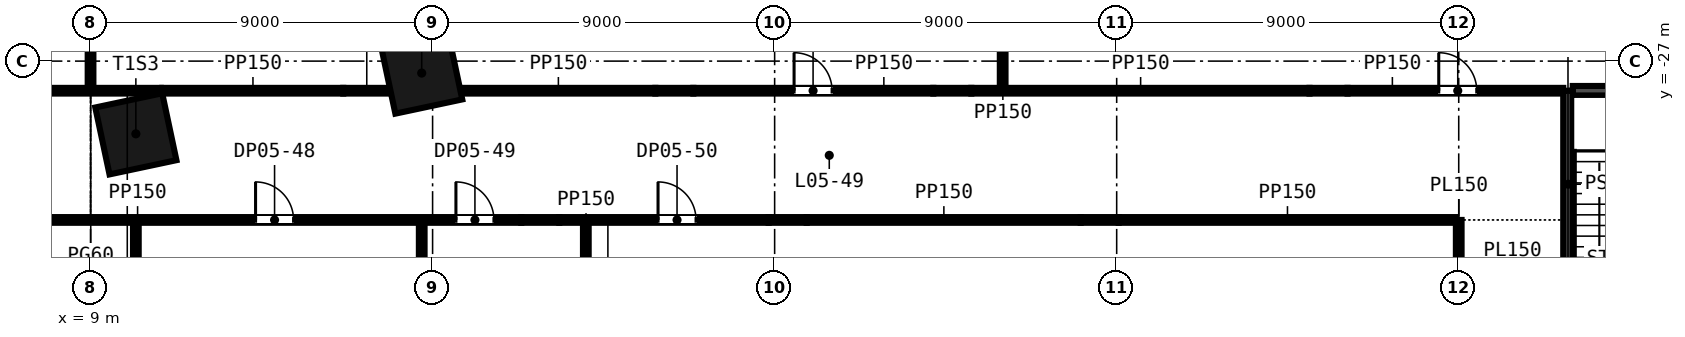
"""IFC4 building model, lengths in metres.
Left out: names, types, materials, properties, quantities, classifications, styles, units other than length and angle.
Written with IfcOpenShell. Run it as: python <this file> out.ifc"""

import sys

from ifc_helpers import new_model, si_unit, direction, frame, frame_2d, origin, origin_2d, place, context, subcontext, project, spatial, rectangle, extrude, element, fill, save


model = new_model("IFC4")
c1 = context("Model", 3, precision=1e-05, world=origin(), true_north=direction((0.0, 1.0)))
c2 = subcontext(c1, "Body", "Model", "MODEL_VIEW")
j1 = project(units=[si_unit("LENGTHUNIT", "METRE"), si_unit("PLANEANGLEUNIT", "RADIAN")], contexts=[c1])
p1 = place(None, origin())
s1 = spatial("IfcSite", under=j1, at=p1, CompositionType="ELEMENT")
p2 = place(p1, origin())
s2 = spatial("IfcBuilding", under=s1, at=p2, CompositionType="ELEMENT")
p3 = place(p2, frame((0.0, 0.0, 31.5)))
s3 = spatial("IfcBuildingStorey", under=s2, at=p3, CompositionType="ELEMENT", Elevation=31.5)
for number, where, z_axis, x_axis in (
    (1, (10.192, -28.914, -0.3), (0.0, 0.0, 1.0), (0.978, 0.208, 0.0)),
    (2, (17.714, -27.315, -0.3), (0.0, 0.0, 1.0), (0.978, 0.208, 0.0)),
):
    element("IfcColumn", number, at=place(p3, frame(where, z_axis=z_axis, x_axis=x_axis)), inside=s3, PredefinedType="COLUMN", context=c2, shape_type="SweptSolid", body=[
        extrude(rectangle(XDim=1.8, YDim=1.8, at=origin_2d()), origin(), (0.0, 0.0, 1.0), 4.65),
    ])
p4 = place(p3, frame((4.223, -31.179, 0.0), z_axis=(0.0, 0.0, 1.0), x_axis=(1.0, 0.0, 0.0)))
e3 = element("IfcWall", 3, at=p4, inside=s3, PredefinedType="PARTITIONING", context=c2, shape_type="SweptSolid", body=[
    extrude(rectangle(XDim=16.11, YDim=0.15, at=frame_2d((8.055, 0.0))), origin(), (0.0, 0.0, 1.0), 4.35),
])
p5 = place(p4, frame((1.9, 0.0, 0.0)))
e4 = element("IfcOpeningElement", 4, at=p5, cuts=e3, PredefinedType="OPENING", context=c2, shape_type="SweptSolid", body=[
    extrude(rectangle(XDim=1.0, YDim=2.1, at=frame_2d((0.5, 1.05))), frame((0.0, 0.085, 0.0), z_axis=(0.0, -1.0, 0.0), x_axis=(1.0, 0.0, 0.0)), (0.0, 0.0, 1.0), 0.17),
])
p6 = place(p4, frame((9.119, 0.0, 0.0)))
e5 = element("IfcOpeningElement", 5, at=p6, cuts=e3, PredefinedType="OPENING", context=c2, shape_type="SweptSolid", body=[
    extrude(rectangle(XDim=1.0, YDim=2.1, at=frame_2d((0.5, 1.05))), frame((0.0, 0.085, 0.0), z_axis=(0.0, -1.0, 0.0), x_axis=(1.0, 0.0, 0.0)), (0.0, 0.0, 1.0), 0.17),
])
p7 = place(p4, frame((14.391, 0.0, 0.0)))
e6 = element("IfcOpeningElement", 6, at=p7, cuts=e3, PredefinedType="OPENING", context=c2, shape_type="SweptSolid", body=[
    extrude(rectangle(XDim=1.0, YDim=2.1, at=frame_2d((0.5, 1.05))), frame((0.0, 0.085, 0.0), z_axis=(0.0, -1.0, 0.0), x_axis=(1.0, 0.0, 0.0)), (0.0, 0.0, 1.0), 0.17),
])
p8 = place(p3, frame((20.333, -31.179, 0.0), z_axis=(0.0, 0.0, 1.0), x_axis=(1.0, 0.0, 0.0)))
e7 = element("IfcWall", 7, at=p8, inside=s3, PredefinedType="PARTITIONING", context=c2, shape_type="SweptSolid", body=[
    extrude(rectangle(XDim=1.0, YDim=0.15, at=frame_2d((0.5, 0.0))), origin(), (0.0, 0.0, 1.0), 3.591),
])
p9 = place(p3, frame((21.333, -31.179, 0.0), z_axis=(0.0, 0.0, 1.0), x_axis=(1.0, 0.0, 0.0)))
e8 = element("IfcWall", 8, at=p9, inside=s3, PredefinedType="PARTITIONING", context=c2, shape_type="SweptSolid", body=[
    extrude(rectangle(XDim=5.51, YDim=0.15, at=frame_2d((2.755, 0.0))), origin(), (0.0, 0.0, 1.0), 4.35),
])
p10 = place(p9, frame((2.599, 0.0, 0.0)))
e9 = element("IfcOpeningElement", 9, at=p10, cuts=e8, PredefinedType="OPENING", context=c2, shape_type="SweptSolid", body=[
    extrude(rectangle(XDim=1.0, YDim=2.1, at=frame_2d((0.5, 1.05))), frame((0.0, 0.085, 0.0), z_axis=(0.0, -1.0, 0.0), x_axis=(1.0, 0.0, 0.0)), (0.0, 0.0, 1.0), 0.17),
])
p11 = place(p3, frame((26.843, -31.179, 0.0), z_axis=(0.0, 0.0, 1.0), x_axis=(1.0, 0.0, 0.0)))
e10 = element("IfcWall", 10, at=p11, inside=s3, PredefinedType="PARTITIONING", context=c2, shape_type="SweptSolid", body=[
    extrude(rectangle(XDim=1.0, YDim=0.15, at=frame_2d((0.5, 0.0))), origin(), (0.0, 0.0, 1.0), 3.436),
])
p12 = place(p3, frame((27.843, -31.179, 0.0), z_axis=(0.0, 0.0, 1.0), x_axis=(1.0, 0.0, 0.0)))
e11 = element("IfcWall", 11, at=p12, inside=s3, PredefinedType="PARTITIONING", context=c2, shape_type="SweptSolid", body=[
    extrude(rectangle(XDim=7.209, YDim=0.15, at=frame_2d((3.605, 0.0))), origin(), (0.0, 0.0, 1.0), 4.35),
])
p13 = place(p3, frame((35.053, -31.179, 0.0), z_axis=(0.0, 0.0, 1.0), x_axis=(1.0, 0.0, 0.0)))
e12 = element("IfcWall", 12, at=p13, inside=s3, PredefinedType="PARTITIONING", context=c2, shape_type="SweptSolid", body=[
    extrude(rectangle(XDim=1.0, YDim=0.15, at=frame_2d((0.5, 0.0))), origin(), (0.0, 0.0, 1.0), 3.261),
])
p14 = place(p3, frame((36.053, -31.179, 0.0), z_axis=(0.0, 0.0, 1.0), x_axis=(1.0, 0.0, 0.0)))
e13 = element("IfcWall", 13, at=p14, inside=s3, PredefinedType="PARTITIONING", context=c2, shape_type="SweptSolid", body=[
    extrude(rectangle(XDim=8.872, YDim=0.15, at=frame_2d((4.436, 0.0))), origin(), (0.0, 0.0, 1.0), 4.35),
])
p15 = place(p3, frame((0.75, -27.779, 0.0), z_axis=(0.0, 0.0, 1.0), x_axis=(1.0, 0.0, 0.0)))
e14 = element("IfcWall", 14, at=p15, inside=s3, PredefinedType="PARTITIONING", context=c2, shape_type="SweptSolid", body=[
    extrude(rectangle(XDim=8.175, YDim=0.15, at=frame_2d((4.087, 0.0))), origin(), (0.0, 0.0, 1.0), 4.35),
])
p16 = place(p3, frame((9.075, -27.779, 0.0), z_axis=(0.0, 0.0, 1.0), x_axis=(1.0, 0.0, 0.0)))
e15 = element("IfcWall", 15, at=p16, inside=s3, PredefinedType="PARTITIONING", context=c2, shape_type="SweptSolid", body=[
    extrude(rectangle(XDim=1.773, YDim=0.15, at=frame_2d((0.886, 0.0))), origin(), (0.0, 0.0, 1.0), 4.35),
])
p17 = place(p3, frame((10.887, -27.779, 0.0), z_axis=(0.0, 0.0, 1.0), x_axis=(1.0, 0.0, 0.0)))
e16 = element("IfcWall", 16, at=p17, inside=s3, PredefinedType="PARTITIONING", context=c2, shape_type="SweptSolid", body=[
    extrude(rectangle(XDim=4.762, YDim=0.15, at=frame_2d((2.381, 0.0))), origin(), (0.0, 0.0, 1.0), 4.35),
])
p18 = place(p3, frame((15.65, -27.779, 0.0), z_axis=(0.0, 0.0, 1.0), x_axis=(1.0, 0.0, 0.0)))
e17 = element("IfcWall", 17, at=p18, inside=s3, PredefinedType="PARTITIONING", context=c2, shape_type="SweptSolid", body=[
    extrude(rectangle(XDim=1.227, YDim=0.15, at=frame_2d((0.613, 0.0))), origin(), (0.0, 0.0, 1.0), 3.5),
])
p19 = place(p3, frame((18.748, -27.779, 0.0), z_axis=(0.0, 0.0, 1.0), x_axis=(1.0, 0.0, 0.0)))
e18 = element("IfcWall", 18, at=p19, inside=s3, PredefinedType="PARTITIONING", context=c2, shape_type="SweptSolid", body=[
    extrude(rectangle(XDim=5.113, YDim=0.15, at=frame_2d((2.557, 0.0))), origin(), (0.0, 0.0, 1.0), 4.35),
])
p20 = place(p3, frame((23.862, -27.779, 0.0), z_axis=(0.0, 0.0, 1.0), x_axis=(1.0, 0.0, 0.0)))
e19 = element("IfcWall", 19, at=p20, inside=s3, PredefinedType="PARTITIONING", context=c2, shape_type="SweptSolid", body=[
    extrude(rectangle(XDim=1.0, YDim=0.15, at=frame_2d((0.5, 0.0))), origin(), (0.0, 0.0, 1.0), 3.436),
])
p21 = place(p3, frame((24.862, -27.779, 0.0), z_axis=(0.0, 0.0, 1.0), x_axis=(1.0, 0.0, 0.0)))
e20 = element("IfcWall", 20, at=p21, inside=s3, PredefinedType="PARTITIONING", context=c2, shape_type="SweptSolid", body=[
    extrude(rectangle(XDim=6.314, YDim=0.15, at=frame_2d((3.157, 0.0))), origin(), (0.0, 0.0, 1.0), 4.35),
])
p22 = place(p21, frame((2.65, 0.0, 0.0)))
e21 = element("IfcOpeningElement", 21, at=p22, cuts=e20, PredefinedType="OPENING", context=c2, shape_type="SweptSolid", body=[
    extrude(rectangle(XDim=1.0, YDim=2.1, at=frame_2d((0.5, 1.05))), frame((0.0, 0.085, 0.0), z_axis=(0.0, -1.0, 0.0), x_axis=(1.0, 0.0, 0.0)), (0.0, 0.0, 1.0), 0.17),
])
p23 = place(p3, frame((31.176, -27.779, 0.0), z_axis=(0.0, 0.0, 1.0), x_axis=(1.0, 0.0, 0.0)))
e22 = element("IfcWall", 22, at=p23, inside=s3, PredefinedType="PARTITIONING", context=c2, shape_type="SweptSolid", body=[
    extrude(rectangle(XDim=1.0, YDim=0.15, at=frame_2d((0.5, 0.0))), origin(), (0.0, 0.0, 1.0), 3.261),
])
p24 = place(p3, frame((32.176, -27.779, 0.0), z_axis=(0.0, 0.0, 1.0), x_axis=(1.0, 0.0, 0.0)))
e23 = element("IfcWall", 23, at=p24, inside=s3, PredefinedType="PARTITIONING", context=c2, shape_type="SweptSolid", body=[
    extrude(rectangle(XDim=8.898, YDim=0.15, at=frame_2d((4.449, 0.0))), origin(), (0.0, 0.0, 1.0), 4.35),
])
p25 = place(p3, frame((41.074, -27.779, 0.0), z_axis=(0.0, 0.0, 1.0), x_axis=(1.0, 0.0, 0.0)))
e24 = element("IfcWall", 24, at=p25, inside=s3, PredefinedType="PARTITIONING", context=c2, shape_type="SweptSolid", body=[
    extrude(rectangle(XDim=1.0, YDim=0.15, at=frame_2d((0.5, 0.0))), origin(), (0.0, 0.0, 1.0), 3.261),
])
p26 = place(p3, frame((42.074, -27.779, 0.0), z_axis=(0.0, 0.0, 1.0), x_axis=(1.0, 0.0, 0.0)))
e25 = element("IfcWall", 25, at=p26, inside=s3, PredefinedType="PARTITIONING", context=c2, shape_type="SweptSolid", body=[
    extrude(rectangle(XDim=5.676, YDim=0.15, at=frame_2d((2.838, 0.0))), origin(), (0.0, 0.0, 1.0), 4.35),
])
p27 = place(p26, frame((2.4, 0.0, 0.0)))
e26 = element("IfcOpeningElement", 26, at=p27, cuts=e25, PredefinedType="OPENING", context=c2, shape_type="SweptSolid", body=[
    extrude(rectangle(XDim=1.0, YDim=2.1, at=frame_2d((0.5, 1.05))), frame((0.0, 0.085, 0.0), z_axis=(0.0, -1.0, 0.0), x_axis=(1.0, 0.0, 0.0)), (0.0, 0.0, 1.0), 0.17),
])
p28 = place(p3, frame((48.0, -27.779, 0.0), z_axis=(0.0, 0.0, 1.0), x_axis=(1.0, 0.0, 0.0)))
e27 = element("IfcWall", 27, at=p28, inside=s3, PredefinedType="SHEAR", context=c2, shape_type="SweptSolid", body=[
    extrude(rectangle(XDim=3.0, YDim=0.25, at=frame_2d((1.5, 0.0))), origin(), (0.0, 0.0, 1.0), 4.35),
])
p29 = place(p3, frame((9.0, -27.778, 0.0), z_axis=(0.0, 0.0, 1.0), x_axis=(0.0, 1.0, 0.0)))
e28 = element("IfcWall", 28, at=p29, inside=s3, PredefinedType="PARTITIONING", context=c2, shape_type="SweptSolid", body=[
    extrude(rectangle(XDim=3.825, YDim=0.15, at=frame_2d((1.913, 0.0))), origin(), (0.0, 0.0, 1.0), 4.35),
])
p30 = place(p3, frame((10.192, -40.4, 0.0), z_axis=(0.0, 0.0, 1.0), x_axis=(0.0, 1.0, 0.0)))
e29 = element("IfcWall", 29, at=p30, inside=s3, PredefinedType="PARTITIONING", context=c2, shape_type="SweptSolid", body=[
    extrude(rectangle(XDim=9.146, YDim=0.15, at=frame_2d((4.573, 0.0))), origin(), (0.0, 0.0, 1.0), 4.35),
])
p31 = place(p3, frame((17.714, -35.42, 0.0), z_axis=(0.0, 0.0, 1.0), x_axis=(0.0, 1.0, 0.0)))
e30 = element("IfcWall", 30, at=p31, inside=s3, PredefinedType="PARTITIONING", context=c2, shape_type="SweptSolid", body=[
    extrude(rectangle(XDim=4.167, YDim=0.15, at=frame_2d((2.083, 0.0))), origin(), (0.0, 0.0, 1.0), 4.35),
])
p32 = place(p3, frame((22.032, -32.473, 0.0), z_axis=(0.0, 0.0, 1.0), x_axis=(0.0, 1.0, 0.0)))
e31 = element("IfcWall", 31, at=p32, inside=s3, PredefinedType="PARTITIONING", context=c2, shape_type="SweptSolid", body=[
    extrude(rectangle(XDim=1.219, YDim=0.15, at=frame_2d((0.61, 0.0))), origin(), (0.0, 0.0, 1.0), 4.35),
])
p33 = place(p3, frame((33.0, -27.704, 0.0), z_axis=(0.0, 0.0, 1.0), x_axis=(0.0, 1.0, 0.0)))
e32 = element("IfcWall", 32, at=p33, inside=s3, PredefinedType="PARTITIONING", context=c2, shape_type="SweptSolid", body=[
    extrude(rectangle(XDim=5.154, YDim=0.15, at=frame_2d((2.577, 0.0))), origin(), (0.0, 0.0, 1.0), 4.35),
])
p34 = place(p3, frame((45.0, -34.6, 0.0), z_axis=(0.0, 0.0, 1.0), x_axis=(0.0, 1.0, 0.0)))
e33 = element("IfcWall", 33, at=p34, inside=s3, PredefinedType="PARTITIONING", context=c2, shape_type="SweptSolid", body=[
    extrude(rectangle(XDim=3.421, YDim=0.15, at=frame_2d((1.71, 0.0))), origin(), (0.0, 0.0, 1.0), 4.35),
])
p35 = place(p3, frame((47.875, -34.6, 0.0), z_axis=(0.0, 0.0, 1.0), x_axis=(0.0, 1.0, 0.0)))
e34 = element("IfcWall", 34, at=p35, inside=s3, PredefinedType="SHEAR", context=c2, shape_type="SweptSolid", body=[
    extrude(rectangle(XDim=6.821, YDim=0.25, at=frame_2d((3.411, 0.0))), origin(), (0.0, 0.0, 1.0), 4.35),
])
p36 = place(p35, frame((0.65, 0.0, 0.0)))
e35 = element("IfcOpeningElement", 35, at=p36, cuts=e34, PredefinedType="OPENING", context=c2, shape_type="SweptSolid", body=[
    extrude(rectangle(XDim=1.2, YDim=2.1, at=frame_2d((0.6, 1.05))), frame((0.0, 0.135, 0.0), z_axis=(0.0, -1.0, 0.0), x_axis=(1.0, 0.0, 0.0)), (0.0, 0.0, 1.0), 0.27),
])
p37 = place(p22, origin())
e36 = element("IfcDoor", 36, at=p37, inside=s3, OperationType="SINGLE_SWING_LEFT", PredefinedType="DOOR", context=c2, shape_type="SweptSolid", body=[
    extrude(rectangle(XDim=1.0, YDim=2.1, at=frame_2d((0.5, 1.05))), frame((0.0, 0.025, 0.0), z_axis=(0.0, -1.0, 0.0), x_axis=(1.0, 0.0, 0.0)), (0.0, 0.0, 1.0), 0.05),
])
fill(e21, e36)
p38 = place(p27, origin())
e37 = element("IfcDoor", 37, at=p38, inside=s3, OperationType="SINGLE_SWING_LEFT", PredefinedType="DOOR", context=c2, shape_type="SweptSolid", body=[
    extrude(rectangle(XDim=1.0, YDim=2.1, at=frame_2d((0.5, 1.05))), frame((0.0, 0.025, 0.0), z_axis=(0.0, -1.0, 0.0), x_axis=(1.0, 0.0, 0.0)), (0.0, 0.0, 1.0), 0.05),
])
fill(e26, e37)
p39 = place(p6, origin())
e38 = element("IfcDoor", 38, at=p39, inside=s3, OperationType="SINGLE_SWING_LEFT", PredefinedType="DOOR", context=c2, shape_type="SweptSolid", body=[
    extrude(rectangle(XDim=1.0, YDim=2.1, at=frame_2d((0.5, 1.05))), frame((0.0, 0.025, 0.0), z_axis=(0.0, -1.0, 0.0), x_axis=(1.0, 0.0, 0.0)), (0.0, 0.0, 1.0), 0.05),
])
fill(e5, e38)
p40 = place(p7, origin())
e39 = element("IfcDoor", 39, at=p40, inside=s3, OperationType="SINGLE_SWING_LEFT", PredefinedType="DOOR", context=c2, shape_type="SweptSolid", body=[
    extrude(rectangle(XDim=1.0, YDim=2.1, at=frame_2d((0.5, 1.05))), frame((0.0, 0.025, 0.0), z_axis=(0.0, -1.0, 0.0), x_axis=(1.0, 0.0, 0.0)), (0.0, 0.0, 1.0), 0.05),
])
fill(e6, e39)
p41 = place(p10, origin())
e40 = element("IfcDoor", 40, at=p41, inside=s3, OperationType="SINGLE_SWING_LEFT", PredefinedType="DOOR", context=c2, shape_type="SweptSolid", body=[
    extrude(rectangle(XDim=1.0, YDim=2.1, at=frame_2d((0.5, 1.05))), frame((0.0, 0.025, 0.0), z_axis=(0.0, -1.0, 0.0), x_axis=(1.0, 0.0, 0.0)), (0.0, 0.0, 1.0), 0.05),
])
fill(e9, e40)
save(model, sys.argv[1])
